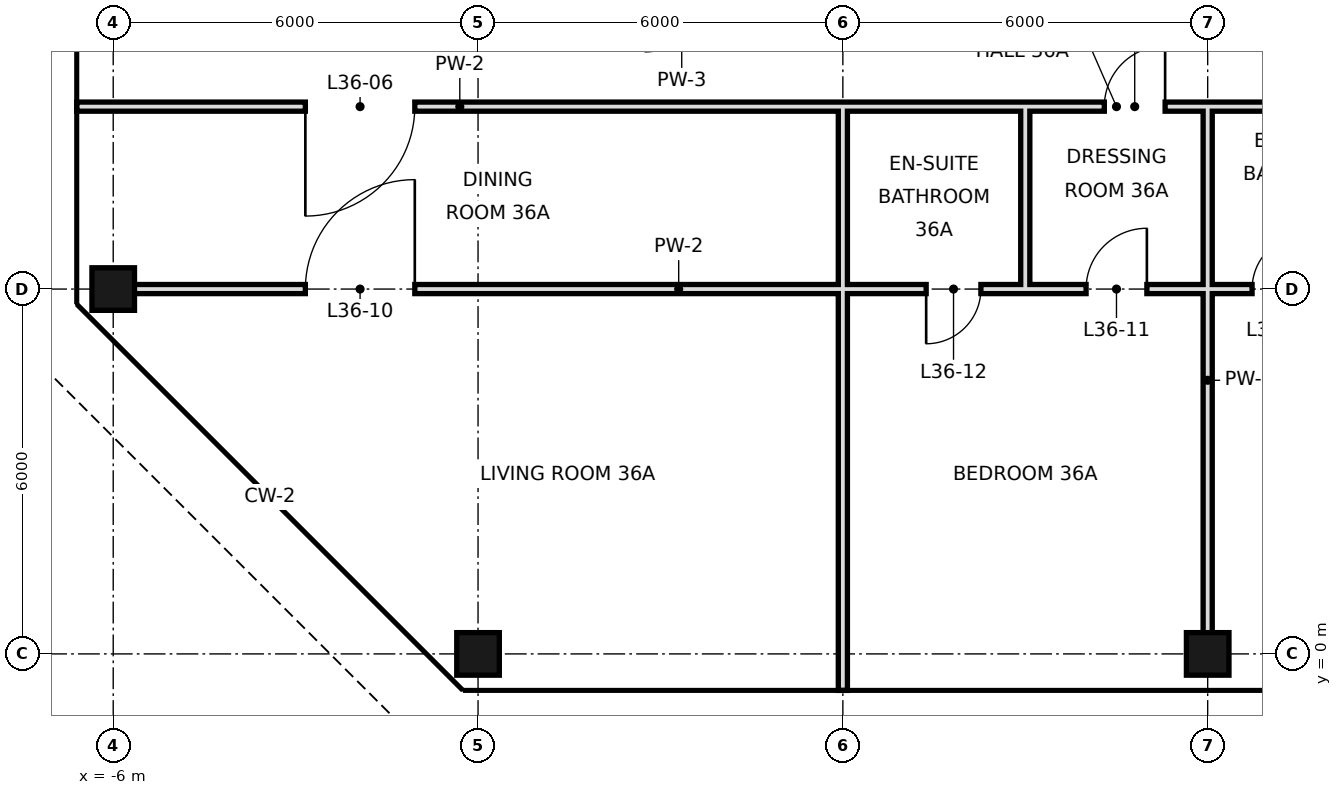
"""IFC4 building model, lengths in metres.
Left out: names, types, materials, properties, quantities, classifications, styles, units other than length and angle.
Written with IfcOpenShell. Run it as: python <this file> out.ifc"""

import sys

from ifc_helpers import new_model, si_unit, direction, frame, frame_2d, origin, origin_2d, place, context, subcontext, project, spatial, rectangle, hollow_rectangle, extrude, element, fill, save


model = new_model("IFC4")
c1 = context("Model", 3, precision=1e-05, world=origin(), true_north=direction((0.0, 1.0)))
c2 = subcontext(c1, "Body", "Model", "MODEL_VIEW")
j1 = project(units=[si_unit("LENGTHUNIT", "METRE"), si_unit("PLANEANGLEUNIT", "RADIAN")], contexts=[c1])
p1 = place(None, origin())
s1 = spatial("IfcSite", under=j1, at=p1, CompositionType="ELEMENT")
p2 = place(p1, origin())
s2 = spatial("IfcBuilding", under=s1, at=p2, CompositionType="ELEMENT")
p3 = place(p2, frame((0.0, 0.0, 158.2)))
s3 = spatial("IfcBuildingStorey", under=s2, at=p3, CompositionType="ELEMENT", Elevation=158.2)
for number, where, z_axis, x_axis in (
    (1, (-6.0, 6.0, 0.0), (0.0, 0.0, 1.0), (1.0, 0.0, 0.0)),
    (2, (0.0, 0.0, 0.0), (0.0, 0.0, 1.0), (1.0, 0.0, 0.0)),
    (3, (12.0, 0.0, 0.0), (0.0, 0.0, 1.0), (1.0, 0.0, 0.0)),
):
    element("IfcColumn", number, at=place(p3, frame(where, z_axis=z_axis, x_axis=x_axis)), inside=s3, PredefinedType="COLUMN", context=c2, shape_type="SweptSolid", body=[
        extrude(hollow_rectangle(XDim=0.7, YDim=0.7, WallThickness=0.036, at=origin_2d()), origin(), (0.0, 0.0, 1.0), 3.6),
    ])
p4 = place(p3, frame((12.0, 0.0, 0.0), z_axis=(0.0, 0.0, 1.0), x_axis=(0.0, 1.0, 0.0)))
e4 = element("IfcWall", 4, at=p4, inside=s3, PredefinedType="PARTITIONING", context=c2, shape_type="SweptSolid", body=[
    extrude(rectangle(XDim=6.0, YDim=0.15, at=frame_2d((3.0, 0.0))), origin(), (0.0, 0.0, 1.0), 2.68),
])
p5 = place(p3, frame((12.0, 6.0, 0.0), z_axis=(0.0, 0.0, 1.0), x_axis=(0.0, 1.0, 0.0)))
e5 = element("IfcWall", 5, at=p5, inside=s3, PredefinedType="PARTITIONING", context=c2, shape_type="SweptSolid", body=[
    extrude(rectangle(XDim=3.0, YDim=0.15, at=frame_2d((1.5, 0.0))), origin(), (0.0, 0.0, 1.0), 2.68),
])
p6 = place(p3, frame((6.0, -0.6, 0.0), z_axis=(0.0, 0.0, 1.0), x_axis=(0.0, 1.0, 0.0)))
e6 = element("IfcWall", 6, at=p6, inside=s3, PredefinedType="PARTITIONING", context=c2, shape_type="SweptSolid", body=[
    extrude(rectangle(XDim=6.6, YDim=0.15, at=frame_2d((3.3, 0.0))), origin(), (0.0, 0.0, 1.0), 2.68),
])
p7 = place(p3, frame((6.0, 6.0, 0.0), z_axis=(0.0, 0.0, 1.0), x_axis=(0.0, 1.0, 0.0)))
e7 = element("IfcWall", 7, at=p7, inside=s3, PredefinedType="PARTITIONING", context=c2, shape_type="SweptSolid", body=[
    extrude(rectangle(XDim=3.0, YDim=0.15, at=frame_2d((1.5, 0.0))), origin(), (0.0, 0.0, 1.0), 2.68),
])
p8 = place(p3, frame((9.0, 6.0, 0.0), z_axis=(0.0, 0.0, 1.0), x_axis=(0.0, 1.0, 0.0)))
e8 = element("IfcWall", 8, at=p8, inside=s3, PredefinedType="PARTITIONING", context=c2, shape_type="SweptSolid", body=[
    extrude(rectangle(XDim=3.0, YDim=0.15, at=frame_2d((1.5, 0.0))), origin(), (0.0, 0.0, 1.0), 3.38),
])
p9 = place(p3, frame((-6.0, 6.0, 0.0), z_axis=(0.0, 0.0, 1.0), x_axis=(1.0, 0.0, 0.0)))
e9 = element("IfcWall", 9, at=p9, inside=s3, PredefinedType="PARTITIONING", context=c2, shape_type="SweptSolid", body=[
    extrude(rectangle(XDim=12.0, YDim=0.15, at=frame_2d((6.0, 0.0))), origin(), (0.0, 0.0, 1.0), 2.93),
])
p10 = place(p9, frame((3.16, 0.0, 0.0)))
e10 = element("IfcOpeningElement", 10, at=p10, cuts=e9, PredefinedType="OPENING", context=c2, shape_type="SweptSolid", body=[
    extrude(rectangle(XDim=1.8, YDim=2.4, at=frame_2d((0.9, 1.2))), frame((0.0, 0.085, 0.0), z_axis=(0.0, -1.0, 0.0), x_axis=(1.0, 0.0, 0.0)), (0.0, 0.0, 1.0), 0.17),
])
p11 = place(p3, frame((9.0, 6.0, 0.0), z_axis=(0.0, 0.0, 1.0), x_axis=(1.0, 0.0, 0.0)))
e11 = element("IfcWall", 11, at=p11, inside=s3, PredefinedType="PARTITIONING", context=c2, shape_type="SweptSolid", body=[
    extrude(rectangle(XDim=3.0, YDim=0.15, at=frame_2d((1.5, 0.0))), origin(), (0.0, 0.0, 1.0), 2.93),
])
p12 = place(p11, frame((1.0, 0.0, 0.0)))
e12 = element("IfcOpeningElement", 12, at=p12, cuts=e11, PredefinedType="OPENING", context=c2, shape_type="SweptSolid", body=[
    extrude(rectangle(XDim=1.0, YDim=2.4, at=frame_2d((0.5, 1.2))), frame((0.0, 0.085, 0.0), z_axis=(0.0, -1.0, 0.0), x_axis=(1.0, 0.0, 0.0)), (0.0, 0.0, 1.0), 0.17),
])
p13 = place(p3, frame((6.0, 6.0, 0.0), z_axis=(0.0, 0.0, 1.0), x_axis=(1.0, 0.0, 0.0)))
e13 = element("IfcWall", 13, at=p13, inside=s3, PredefinedType="PARTITIONING", context=c2, shape_type="SweptSolid", body=[
    extrude(rectangle(XDim=3.0, YDim=0.15, at=frame_2d((1.5, 0.0))), origin(), (0.0, 0.0, 1.0), 2.93),
])
p14 = place(p13, frame((1.37, 0.0, 0.0)))
e14 = element("IfcOpeningElement", 14, at=p14, cuts=e13, PredefinedType="OPENING", context=c2, shape_type="SweptSolid", body=[
    extrude(rectangle(XDim=0.9, YDim=2.4, at=frame_2d((0.45, 1.2))), frame((0.0, 0.085, 0.0), z_axis=(0.0, -1.0, 0.0), x_axis=(1.0, 0.0, 0.0)), (0.0, 0.0, 1.0), 0.17),
])
p15 = place(p3, frame((12.0, 6.0, 0.0), z_axis=(0.0, 0.0, 1.0), x_axis=(1.0, 0.0, 0.0)))
e15 = element("IfcWall", 15, at=p15, inside=s3, PredefinedType="PARTITIONING", context=c2, shape_type="SweptSolid", body=[
    extrude(rectangle(XDim=3.0, YDim=0.15, at=frame_2d((1.5, 0.0))), origin(), (0.0, 0.0, 1.0), 2.93),
])
p16 = place(p15, frame((0.73, 0.0, 0.0)))
e16 = element("IfcOpeningElement", 16, at=p16, cuts=e15, PredefinedType="OPENING", context=c2, shape_type="SweptSolid", body=[
    extrude(rectangle(XDim=0.9, YDim=2.4, at=frame_2d((0.45, 1.2))), frame((0.0, 0.085, 0.0), z_axis=(0.0, -1.0, 0.0), x_axis=(1.0, 0.0, 0.0)), (0.0, 0.0, 1.0), 0.17),
])
p17 = place(p3, frame((-6.6, 9.0, 0.0), z_axis=(0.0, 0.0, 1.0), x_axis=(1.0, 0.0, 0.0)))
e17 = element("IfcWall", 17, at=p17, inside=s3, PredefinedType="PARTITIONING", context=c2, shape_type="SweptSolid", body=[
    extrude(rectangle(XDim=12.6, YDim=0.15, at=frame_2d((6.3, 0.0))), origin(), (0.0, 0.0, 1.0), 3.38),
])
p18 = place(p17, frame((3.76, 0.0, 0.0)))
e18 = element("IfcOpeningElement", 18, at=p18, cuts=e17, PredefinedType="OPENING", context=c2, shape_type="SweptSolid", body=[
    extrude(rectangle(XDim=1.8, YDim=2.4, at=frame_2d((0.9, 1.2))), frame((0.0, 0.085, 0.0), z_axis=(0.0, -1.0, 0.0), x_axis=(1.0, 0.0, 0.0)), (0.0, 0.0, 1.0), 0.17),
])
p19 = place(p3, frame((9.0, 9.0, 0.0), z_axis=(0.0, 0.0, 1.0), x_axis=(1.0, 0.0, 0.0)))
e19 = element("IfcWall", 19, at=p19, inside=s3, PredefinedType="PARTITIONING", context=c2, shape_type="SweptSolid", body=[
    extrude(rectangle(XDim=3.0, YDim=0.15, at=frame_2d((1.5, 0.0))), origin(), (0.0, 0.0, 1.0), 3.38),
])
p20 = place(p19, frame((1.3, 0.0, 0.0)))
e20 = element("IfcOpeningElement", 20, at=p20, cuts=e19, PredefinedType="OPENING", context=c2, shape_type="SweptSolid", body=[
    extrude(rectangle(XDim=1.0, YDim=2.4, at=frame_2d((0.5, 1.2))), frame((0.0, 0.085, 0.0), z_axis=(0.0, -1.0, 0.0), x_axis=(1.0, 0.0, 0.0)), (0.0, 0.0, 1.0), 0.17),
])
for number, where, z_axis, x_axis in (
    (21, (6.0, 9.0, 0.0), (0.0, 0.0, 1.0), (1.0, 0.0, 0.0)),
    (22, (12.0, 9.0, 0.0), (0.0, 0.0, 1.0), (1.0, 0.0, 0.0)),
):
    element("IfcWall", number, at=place(p3, frame(where, z_axis=z_axis, x_axis=x_axis)), inside=s3, PredefinedType="PARTITIONING", context=c2, shape_type="SweptSolid", body=[
        extrude(rectangle(XDim=3.0, YDim=0.15, at=frame_2d((1.5, 0.0))), origin(), (0.0, 0.0, 1.0), 3.38),
    ])
p21 = place(p18, frame((1.8, 0.0, 0.0), z_axis=(0.0, 0.0, 1.0), x_axis=(-1.0, 0.0, 0.0)))
e23 = element("IfcDoor", 23, at=p21, inside=s3, OperationType="SINGLE_SWING_RIGHT", PredefinedType="DOOR", context=c2, shape_type="SweptSolid", body=[
    extrude(rectangle(XDim=1.8, YDim=2.4, at=frame_2d((0.9, 1.2))), frame((0.0, 0.025, 0.0), z_axis=(0.0, -1.0, 0.0), x_axis=(1.0, 0.0, 0.0)), (0.0, 0.0, 1.0), 0.05),
])
fill(e18, e23)
p22 = place(p20, frame((1.0, 0.0, 0.0), z_axis=(0.0, 0.0, 1.0), x_axis=(-1.0, 0.0, 0.0)))
e24 = element("IfcDoor", 24, at=p22, inside=s3, OperationType="SINGLE_SWING_LEFT", PredefinedType="DOOR", context=c2, shape_type="SweptSolid", body=[
    extrude(rectangle(XDim=1.0, YDim=2.4, at=frame_2d((0.5, 1.2))), frame((0.0, 0.025, 0.0), z_axis=(0.0, -1.0, 0.0), x_axis=(1.0, 0.0, 0.0)), (0.0, 0.0, 1.0), 0.05),
])
fill(e20, e24)
p23 = place(p10, frame((1.8, 0.0, 0.0), z_axis=(0.0, 0.0, 1.0), x_axis=(-1.0, 0.0, 0.0)))
e25 = element("IfcDoor", 25, at=p23, inside=s3, OperationType="SINGLE_SWING_LEFT", PredefinedType="DOOR", context=c2, shape_type="SweptSolid", body=[
    extrude(rectangle(XDim=1.8, YDim=2.4, at=frame_2d((0.9, 1.2))), frame((0.0, 0.025, 0.0), z_axis=(0.0, -1.0, 0.0), x_axis=(1.0, 0.0, 0.0)), (0.0, 0.0, 1.0), 0.05),
])
fill(e10, e25)
p24 = place(p12, frame((1.0, 0.0, 0.0), z_axis=(0.0, 0.0, 1.0), x_axis=(-1.0, 0.0, 0.0)))
e26 = element("IfcDoor", 26, at=p24, inside=s3, OperationType="SINGLE_SWING_LEFT", PredefinedType="DOOR", context=c2, shape_type="SweptSolid", body=[
    extrude(rectangle(XDim=1.0, YDim=2.4, at=frame_2d((0.5, 1.2))), frame((0.0, 0.025, 0.0), z_axis=(0.0, -1.0, 0.0), x_axis=(1.0, 0.0, 0.0)), (0.0, 0.0, 1.0), 0.05),
])
fill(e12, e26)
p25 = place(p14, frame((0.9, 0.0, 0.0), z_axis=(0.0, 0.0, 1.0), x_axis=(-1.0, 0.0, 0.0)))
e27 = element("IfcDoor", 27, at=p25, inside=s3, OperationType="SINGLE_SWING_RIGHT", PredefinedType="DOOR", context=c2, shape_type="SweptSolid", body=[
    extrude(rectangle(XDim=0.9, YDim=2.4, at=frame_2d((0.45, 1.2))), frame((0.0, 0.025, 0.0), z_axis=(0.0, -1.0, 0.0), x_axis=(1.0, 0.0, 0.0)), (0.0, 0.0, 1.0), 0.05),
])
fill(e14, e27)
p26 = place(p16, frame((0.9, 0.0, 0.0), z_axis=(0.0, 0.0, 1.0), x_axis=(-1.0, 0.0, 0.0)))
e28 = element("IfcDoor", 28, at=p26, inside=s3, OperationType="SINGLE_SWING_LEFT", PredefinedType="DOOR", context=c2, shape_type="SweptSolid", body=[
    extrude(rectangle(XDim=0.9, YDim=2.4, at=frame_2d((0.45, 1.2))), frame((0.0, 0.025, 0.0), z_axis=(0.0, -1.0, 0.0), x_axis=(1.0, 0.0, 0.0)), (0.0, 0.0, 1.0), 0.05),
])
fill(e16, e28)
save(model, sys.argv[1])
